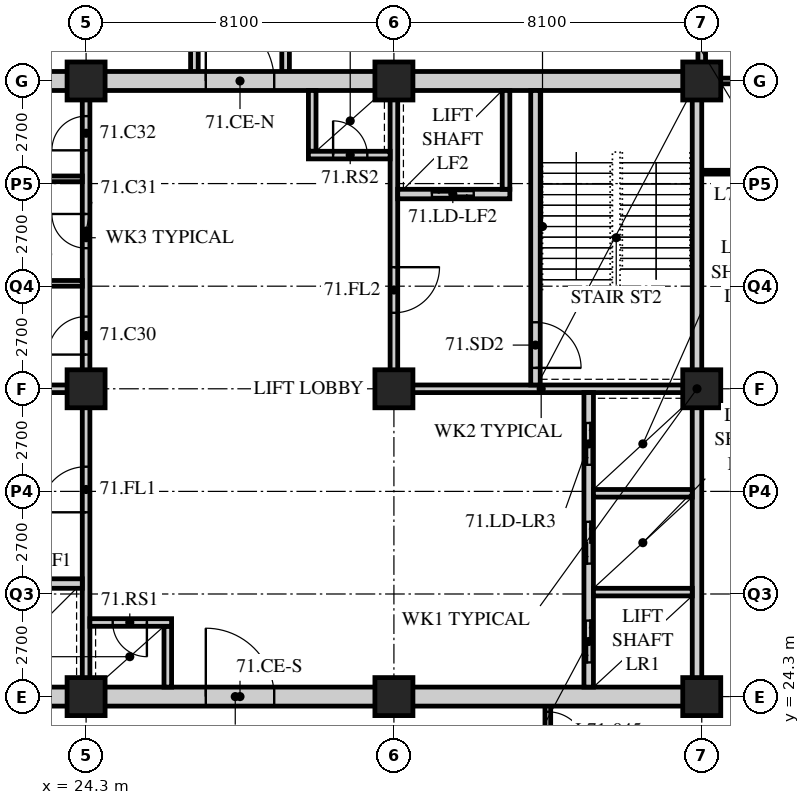
"""IFC4 building model, lengths in metres.
Left out: names, types, materials, properties, quantities, classifications, styles, units other than length and angle.
Written with IfcOpenShell. Run it as: python <this file> out.ifc"""

import sys

from ifc_helpers import new_model, si_unit, direction, frame, frame_2d, origin, origin_2d, place, context, subcontext, project, spatial, rectangle, hollow_rectangle, extrude, element, fill, save


model = new_model("IFC4")
c1 = context("Model", 3, precision=1e-05, world=origin(), true_north=direction((0.0, 1.0)))
c2 = subcontext(c1, "Body", "Model", "MODEL_VIEW")
j1 = project(units=[si_unit("LENGTHUNIT", "METRE"), si_unit("PLANEANGLEUNIT", "RADIAN")], contexts=[c1])
p1 = place(None, origin())
s1 = spatial("IfcSite", under=j1, at=p1, CompositionType="ELEMENT")
p2 = place(p1, origin())
s2 = spatial("IfcBuilding", under=s1, at=p2, CompositionType="ELEMENT")
p3 = place(p2, frame((0.0, 0.0, 277.5)))
s3 = spatial("IfcBuildingStorey", under=s2, at=p3, CompositionType="ELEMENT", Elevation=277.5)
for number, where, z_axis, x_axis in (
    (1, (24.3, 24.3, 0.0), (0.0, 0.0, 1.0), (1.0, 0.0, 0.0)),
    (2, (24.3, 32.4, 0.0), (0.0, 0.0, 1.0), (1.0, 0.0, 0.0)),
    (3, (24.3, 40.5, 0.0), (0.0, 0.0, 1.0), (1.0, 0.0, 0.0)),
    (4, (32.4, 24.3, 0.0), (0.0, 0.0, 1.0), (1.0, 0.0, 0.0)),
    (5, (32.4, 32.4, 0.0), (0.0, 0.0, 1.0), (1.0, 0.0, 0.0)),
    (6, (32.4, 40.5, 0.0), (0.0, 0.0, 1.0), (1.0, 0.0, 0.0)),
    (7, (40.5, 24.3, 0.0), (0.0, 0.0, 1.0), (1.0, 0.0, 0.0)),
    (8, (40.5, 32.4, 0.0), (0.0, 0.0, 1.0), (1.0, 0.0, 0.0)),
    (9, (40.5, 40.5, 0.0), (0.0, 0.0, 1.0), (1.0, 0.0, 0.0)),
):
    element("IfcColumn", number, at=place(p3, frame(where, z_axis=z_axis, x_axis=x_axis)), inside=s3, PredefinedType="COLUMN", context=c2, shape_type="SweptSolid", body=[
        extrude(hollow_rectangle(XDim=1.0, YDim=1.0, WallThickness=0.1, at=origin_2d()), origin(), (0.0, 0.0, 1.0), 3.9),
    ])
for number, where, z_axis, x_axis in (
    (10, (27.15, 40.5, 0.0), (0.0, 0.0, 1.0), (0.0, 1.0, 0.0)),
    (11, (29.55, 40.5, 0.0), (0.0, 0.0, 1.0), (0.0, 1.0, 0.0)),
):
    element("IfcWall", number, at=place(p3, frame(where, z_axis=z_axis, x_axis=x_axis)), inside=s3, PredefinedType="SOLIDWALL", context=c2, shape_type="SweptSolid", body=[
        extrude(rectangle(XDim=10.35, YDim=0.2, at=frame_2d((5.175, 0.0))), origin(), (0.0, 0.0, 1.0), 3.69),
    ])
p4 = place(p3, frame((36.45, 22.5, 0.0), z_axis=(0.0, 0.0, 1.0), x_axis=(0.0, 1.0, 0.0)))
e12 = element("IfcWall", 12, at=p4, inside=s3, PredefinedType="PARTITIONING", context=c2, shape_type="SweptSolid", body=[
    extrude(rectangle(XDim=1.8, YDim=0.15, at=frame_2d((0.9, 0.0))), origin(), (0.0, 0.0, 1.0), 3.69),
])
p5 = place(p4, frame((0.4, 0.0, 0.0)))
e13 = element("IfcOpeningElement", 13, at=p5, cuts=e12, PredefinedType="OPENING", context=c2, shape_type="SweptSolid", body=[
    extrude(rectangle(XDim=1.0, YDim=2.1, at=frame_2d((0.5, 1.05))), frame((0.0, 0.085, 0.0), z_axis=(0.0, -1.0, 0.0), x_axis=(1.0, 0.0, 0.0)), (0.0, 0.0, 1.0), 0.17),
])
p6 = place(p3, frame((40.5, 40.5, 0.0), z_axis=(0.0, 0.0, 1.0), x_axis=(0.0, 1.0, 0.0)))
e14 = element("IfcWall", 14, at=p6, inside=s3, PredefinedType="SOLIDWALL", context=c2, shape_type="SweptSolid", body=[
    extrude(rectangle(XDim=10.35, YDim=0.2, at=frame_2d((5.175, 0.0))), origin(), (0.0, 0.0, 1.0), 3.078),
])
p7 = place(p3, frame((40.5, 38.1, 0.0), z_axis=(0.0, 0.0, 1.0), x_axis=(1.0, 0.0, 0.0)))
e15 = element("IfcWall", 15, at=p7, inside=s3, PredefinedType="PARTITIONING", context=c2, shape_type="SweptSolid", body=[
    extrude(rectangle(XDim=2.4, YDim=0.1, at=frame_2d((1.2, 0.0))), origin(), (0.0, 0.0, 1.0), 3.69),
])
p8 = place(p7, frame((0.8, 0.0, 0.0)))
e16 = element("IfcOpeningElement", 16, at=p8, cuts=e15, PredefinedType="OPENING", context=c2, shape_type="SweptSolid", body=[
    extrude(rectangle(XDim=0.8, YDim=2.1, at=frame_2d((0.4, 1.05))), frame((0.0, 0.06, 0.0), z_axis=(0.0, -1.0, 0.0), x_axis=(1.0, 0.0, 0.0)), (0.0, 0.0, 1.0), 0.12),
])
p9 = place(p3, frame((40.5, 40.5, 0.0), z_axis=(0.0, 0.0, 1.0), x_axis=(1.0, 0.0, 0.0)))
e17 = element("IfcWall", 17, at=p9, inside=s3, PredefinedType="PARTITIONING", context=c2, shape_type="SweptSolid", body=[
    extrude(rectangle(XDim=15.9, YDim=0.15, at=frame_2d((7.95, 0.0))), origin(), (0.0, 0.0, 1.0), 3.078),
])
p10 = place(p3, frame((15.95, 24.3, 0.0), z_axis=(0.0, 0.0, 1.0), x_axis=(1.0, 0.0, 0.0)))
e18 = element("IfcWall", 18, at=p10, inside=s3, PredefinedType="SOLIDWALL", context=c2, shape_type="SweptSolid", body=[
    extrude(rectangle(XDim=24.55, YDim=0.5, at=frame_2d((12.275, 0.0))), origin(), (0.0, 0.0, 1.0), 3.04),
])
p11 = place(p10, frame((11.5, 0.0, 0.0)))
e19 = element("IfcOpeningElement", 19, at=p11, cuts=e18, PredefinedType="OPENING", context=c2, shape_type="SweptSolid", body=[
    extrude(rectangle(XDim=1.8, YDim=2.4, at=frame_2d((0.9, 1.2))), frame((0.0, 0.26, 0.0), z_axis=(0.0, -1.0, 0.0), x_axis=(1.0, 0.0, 0.0)), (0.0, 0.0, 1.0), 0.52),
])
p12 = place(p3, frame((15.95, 40.5, 0.0), z_axis=(0.0, 0.0, 1.0), x_axis=(1.0, 0.0, 0.0)))
e20 = element("IfcWall", 20, at=p12, inside=s3, PredefinedType="SOLIDWALL", context=c2, shape_type="SweptSolid", body=[
    extrude(rectangle(XDim=24.55, YDim=0.5, at=frame_2d((12.275, 0.0))), origin(), (0.0, 0.0, 1.0), 3.04),
])
p13 = place(p12, frame((11.5, 0.0, 0.0)))
e21 = element("IfcOpeningElement", 21, at=p13, cuts=e20, PredefinedType="OPENING", context=c2, shape_type="SweptSolid", body=[
    extrude(rectangle(XDim=1.8, YDim=2.4, at=frame_2d((0.9, 1.2))), frame((0.0, 0.26, 0.0), z_axis=(0.0, -1.0, 0.0), x_axis=(1.0, 0.0, 0.0)), (0.0, 0.0, 1.0), 0.52),
])
p14 = place(p3, frame((40.375, 24.55, 0.0), z_axis=(0.0, 0.0, 1.0), x_axis=(0.0, 1.0, 0.0)))
e22 = element("IfcWall", 22, at=p14, inside=s3, PredefinedType="SOLIDWALL", context=c2, shape_type="SweptSolid", body=[
    extrude(rectangle(XDim=15.7, YDim=0.25, at=frame_2d((7.85, 0.0))), origin(), (0.0, 0.0, 1.0), 3.078),
])
p15 = place(p3, frame((16.45, 32.4, 0.0), z_axis=(0.0, 0.0, 1.0), x_axis=(1.0, 0.0, 0.0)))
e23 = element("IfcWall", 23, at=p15, inside=s3, PredefinedType="SOLIDWALL", context=c2, shape_type="SweptSolid", body=[
    extrude(rectangle(XDim=7.95, YDim=0.2, at=frame_2d((3.975, 0.0))), origin(), (0.0, 0.0, 1.0), 3.078),
])
p16 = place(p3, frame((24.3, 24.55, 0.0), z_axis=(0.0, 0.0, 1.0), x_axis=(0.0, 1.0, 0.0)))
e24 = element("IfcWall", 24, at=p16, inside=s3, PredefinedType="SOLIDWALL", context=c2, shape_type="SweptSolid", body=[
    extrude(rectangle(XDim=7.75, YDim=0.2, at=frame_2d((3.875, 0.0))), origin(), (0.0, 0.0, 1.0), 3.078),
])
p17 = place(p16, frame((4.6, 0.0, 0.0)))
e25 = element("IfcOpeningElement", 25, at=p17, cuts=e24, PredefinedType="OPENING", context=c2, shape_type="SweptSolid", body=[
    extrude(rectangle(XDim=1.2, YDim=2.1, at=frame_2d((0.6, 1.05))), frame((0.0, 0.11, 0.0), z_axis=(0.0, -1.0, 0.0), x_axis=(1.0, 0.0, 0.0)), (0.0, 0.0, 1.0), 0.22),
])
p18 = place(p3, frame((21.25, 27.275, 0.0), z_axis=(0.0, 0.0, 1.0), x_axis=(1.0, 0.0, 0.0)))
e26 = element("IfcWall", 26, at=p18, inside=s3, PredefinedType="SOLIDWALL", context=c2, shape_type="SweptSolid", body=[
    extrude(rectangle(XDim=2.95, YDim=0.25, at=frame_2d((1.475, 0.0))), origin(), (0.0, 0.0, 1.0), 3.69),
])
p19 = place(p18, frame((0.95, 0.0, 0.0)))
e27 = element("IfcOpeningElement", 27, at=p19, cuts=e26, PredefinedType="OPENING", context=c2, shape_type="SweptSolid", body=[
    extrude(rectangle(XDim=1.1, YDim=2.4, at=frame_2d((0.55, 1.2))), frame((0.0, 0.135, 0.0), z_axis=(0.0, -1.0, 0.0), x_axis=(1.0, 0.0, 0.0)), (0.0, 0.0, 1.0), 0.27),
])
p20 = place(p3, frame((26.45, 24.55, 0.0), z_axis=(0.0, 0.0, 1.0), x_axis=(0.0, 1.0, 0.0)))
e28 = element("IfcWall", 28, at=p20, inside=s3, PredefinedType="SOLIDWALL", context=c2, shape_type="SweptSolid", body=[
    extrude(rectangle(XDim=1.6, YDim=0.2, at=frame_2d((0.8, 0.0))), origin(), (0.0, 0.0, 1.0), 3.69),
])
p21 = place(p3, frame((24.4, 26.25, 0.0), z_axis=(0.0, 0.0, 1.0), x_axis=(1.0, 0.0, 0.0)))
e29 = element("IfcWall", 29, at=p21, inside=s3, PredefinedType="SOLIDWALL", context=c2, shape_type="SweptSolid", body=[
    extrude(rectangle(XDim=2.15, YDim=0.2, at=frame_2d((1.075, 0.0))), origin(), (0.0, 0.0, 1.0), 3.69),
])
p22 = place(p21, frame((0.6, 0.0, 0.0)))
e30 = element("IfcOpeningElement", 30, at=p22, cuts=e29, PredefinedType="OPENING", context=c2, shape_type="SweptSolid", body=[
    extrude(rectangle(XDim=0.9, YDim=2.1, at=frame_2d((0.45, 1.05))), frame((0.0, 0.11, 0.0), z_axis=(0.0, -1.0, 0.0), x_axis=(1.0, 0.0, 0.0)), (0.0, 0.0, 1.0), 0.22),
])
p23 = place(p3, frame((32.3, 32.4, 0.0), z_axis=(0.0, 0.0, 1.0), x_axis=(1.0, 0.0, 0.0)))
e31 = element("IfcWall", 31, at=p23, inside=s3, PredefinedType="SOLIDWALL", context=c2, shape_type="SweptSolid", body=[
    extrude(rectangle(XDim=7.95, YDim=0.2, at=frame_2d((3.975, 0.0))), origin(), (0.0, 0.0, 1.0), 3.078),
])
p24 = place(p3, frame((32.4, 32.5, 0.0), z_axis=(0.0, 0.0, 1.0), x_axis=(0.0, 1.0, 0.0)))
e32 = element("IfcWall", 32, at=p24, inside=s3, PredefinedType="SOLIDWALL", context=c2, shape_type="SweptSolid", body=[
    extrude(rectangle(XDim=7.75, YDim=0.2, at=frame_2d((3.875, 0.0))), origin(), (0.0, 0.0, 1.0), 3.078),
])
p25 = place(p24, frame((1.9, 0.0, 0.0)))
e33 = element("IfcOpeningElement", 33, at=p25, cuts=e32, PredefinedType="OPENING", context=c2, shape_type="SweptSolid", body=[
    extrude(rectangle(XDim=1.2, YDim=2.1, at=frame_2d((0.6, 1.05))), frame((0.0, 0.11, 0.0), z_axis=(0.0, -1.0, 0.0), x_axis=(1.0, 0.0, 0.0)), (0.0, 0.0, 1.0), 0.22),
])
p26 = place(p3, frame((37.525, 24.55, 0.0), z_axis=(0.0, 0.0, 1.0), x_axis=(0.0, 1.0, 0.0)))
e34 = element("IfcWall", 34, at=p26, inside=s3, PredefinedType="SOLIDWALL", context=c2, shape_type="SweptSolid", body=[
    extrude(rectangle(XDim=7.75, YDim=0.25, at=frame_2d((3.875, 0.0))), origin(), (0.0, 0.0, 1.0), 3.69),
])
p27 = place(p26, frame((0.65, 0.0, 0.0)))
e35 = element("IfcOpeningElement", 35, at=p27, cuts=e34, PredefinedType="OPENING", context=c2, shape_type="SweptSolid", body=[
    extrude(rectangle(XDim=1.1, YDim=2.4, at=frame_2d((0.55, 1.2))), frame((0.0, 0.135, 0.0), z_axis=(0.0, -1.0, 0.0), x_axis=(1.0, 0.0, 0.0)), (0.0, 0.0, 1.0), 0.27),
])
p28 = place(p26, frame((3.25, 0.0, 0.0)))
e36 = element("IfcOpeningElement", 36, at=p28, cuts=e34, PredefinedType="OPENING", context=c2, shape_type="SweptSolid", body=[
    extrude(rectangle(XDim=1.1, YDim=2.4, at=frame_2d((0.55, 1.2))), frame((0.0, 0.135, 0.0), z_axis=(0.0, -1.0, 0.0), x_axis=(1.0, 0.0, 0.0)), (0.0, 0.0, 1.0), 0.27),
])
p29 = place(p26, frame((5.85, 0.0, 0.0)))
e37 = element("IfcOpeningElement", 37, at=p29, cuts=e34, PredefinedType="OPENING", context=c2, shape_type="SweptSolid", body=[
    extrude(rectangle(XDim=1.1, YDim=2.4, at=frame_2d((0.55, 1.2))), frame((0.0, 0.135, 0.0), z_axis=(0.0, -1.0, 0.0), x_axis=(1.0, 0.0, 0.0)), (0.0, 0.0, 1.0), 0.27),
])
for number, where, z_axis, x_axis in (
    (38, (37.65, 27.05, 0.0), (0.0, 0.0, 1.0), (1.0, 0.0, 0.0)),
    (39, (37.65, 29.65, 0.0), (0.0, 0.0, 1.0), (1.0, 0.0, 0.0)),
):
    element("IfcWall", number, at=place(p3, frame(where, z_axis=z_axis, x_axis=x_axis)), inside=s3, PredefinedType="SOLIDWALL", context=c2, shape_type="SweptSolid", body=[
        extrude(rectangle(XDim=2.6, YDim=0.2, at=frame_2d((1.3, 0.0))), origin(), (0.0, 0.0, 1.0), 3.69),
    ])
p30 = place(p3, frame((36.125, 32.5, 0.0), z_axis=(0.0, 0.0, 1.0), x_axis=(0.0, 1.0, 0.0)))
e40 = element("IfcWall", 40, at=p30, inside=s3, PredefinedType="SOLIDWALL", context=c2, shape_type="SweptSolid", body=[
    extrude(rectangle(XDim=7.75, YDim=0.25, at=frame_2d((3.875, 0.0))), origin(), (0.0, 0.0, 1.0), 3.69),
])
p31 = place(p30, frame((0.45, 0.0, 0.0)))
e41 = element("IfcOpeningElement", 41, at=p31, cuts=e40, PredefinedType="OPENING", context=c2, shape_type="SweptSolid", body=[
    extrude(rectangle(XDim=1.2, YDim=2.1, at=frame_2d((0.6, 1.05))), frame((0.0, 0.135, 0.0), z_axis=(0.0, -1.0, 0.0), x_axis=(1.0, 0.0, 0.0)), (0.0, 0.0, 1.0), 0.27),
])
p32 = place(p3, frame((32.5, 37.525, 0.0), z_axis=(0.0, 0.0, 1.0), x_axis=(1.0, 0.0, 0.0)))
e42 = element("IfcWall", 42, at=p32, inside=s3, PredefinedType="SOLIDWALL", context=c2, shape_type="SweptSolid", body=[
    extrude(rectangle(XDim=2.95, YDim=0.25, at=frame_2d((1.475, 0.0))), origin(), (0.0, 0.0, 1.0), 3.69),
])
p33 = place(p32, frame((0.9, 0.0, 0.0)))
e43 = element("IfcOpeningElement", 43, at=p33, cuts=e42, PredefinedType="OPENING", context=c2, shape_type="SweptSolid", body=[
    extrude(rectangle(XDim=1.1, YDim=2.4, at=frame_2d((0.55, 1.2))), frame((0.0, 0.135, 0.0), z_axis=(0.0, -1.0, 0.0), x_axis=(1.0, 0.0, 0.0)), (0.0, 0.0, 1.0), 0.27),
])
p34 = place(p3, frame((35.35, 37.65, 0.0), z_axis=(0.0, 0.0, 1.0), x_axis=(0.0, 1.0, 0.0)))
e44 = element("IfcWall", 44, at=p34, inside=s3, PredefinedType="SOLIDWALL", context=c2, shape_type="SweptSolid", body=[
    extrude(rectangle(XDim=2.6, YDim=0.2, at=frame_2d((1.3, 0.0))), origin(), (0.0, 0.0, 1.0), 3.69),
])
p35 = place(p3, frame((30.25, 38.65, 0.0), z_axis=(0.0, 0.0, 1.0), x_axis=(0.0, 1.0, 0.0)))
e45 = element("IfcWall", 45, at=p35, inside=s3, PredefinedType="SOLIDWALL", context=c2, shape_type="SweptSolid", body=[
    extrude(rectangle(XDim=1.6, YDim=0.2, at=frame_2d((0.8, 0.0))), origin(), (0.0, 0.0, 1.0), 3.69),
])
p36 = place(p3, frame((30.15, 38.55, 0.0), z_axis=(0.0, 0.0, 1.0), x_axis=(1.0, 0.0, 0.0)))
e46 = element("IfcWall", 46, at=p36, inside=s3, PredefinedType="SOLIDWALL", context=c2, shape_type="SweptSolid", body=[
    extrude(rectangle(XDim=2.15, YDim=0.2, at=frame_2d((1.075, 0.0))), origin(), (0.0, 0.0, 1.0), 3.69),
])
p37 = place(p36, frame((0.65, 0.0, 0.0)))
e47 = element("IfcOpeningElement", 47, at=p37, cuts=e46, PredefinedType="OPENING", context=c2, shape_type="SweptSolid", body=[
    extrude(rectangle(XDim=0.9, YDim=2.1, at=frame_2d((0.45, 1.05))), frame((0.0, 0.11, 0.0), z_axis=(0.0, -1.0, 0.0), x_axis=(1.0, 0.0, 0.0)), (0.0, 0.0, 1.0), 0.22),
])
p38 = place(p3, frame((24.3, 32.5, 0.0), z_axis=(0.0, 0.0, 1.0), x_axis=(0.0, 1.0, 0.0)))
e48 = element("IfcWall", 48, at=p38, inside=s3, PredefinedType="PARTITIONING", context=c2, shape_type="SweptSolid", body=[
    extrude(rectangle(XDim=7.75, YDim=0.2, at=frame_2d((3.875, 0.0))), origin(), (0.0, 0.0, 1.0), 3.078),
])
p39 = place(p38, frame((0.8, 0.0, 0.0)))
e49 = element("IfcOpeningElement", 49, at=p39, cuts=e48, PredefinedType="OPENING", context=c2, shape_type="SweptSolid", body=[
    extrude(rectangle(XDim=1.0, YDim=2.1, at=frame_2d((0.5, 1.05))), frame((0.0, 0.11, 0.0), z_axis=(0.0, -1.0, 0.0), x_axis=(1.0, 0.0, 0.0)), (0.0, 0.0, 1.0), 0.22),
])
p40 = place(p38, frame((3.6, 0.0, 0.0)))
e50 = element("IfcOpeningElement", 50, at=p40, cuts=e48, PredefinedType="OPENING", context=c2, shape_type="SweptSolid", body=[
    extrude(rectangle(XDim=0.9, YDim=2.1, at=frame_2d((0.45, 1.05))), frame((0.0, 0.11, 0.0), z_axis=(0.0, -1.0, 0.0), x_axis=(1.0, 0.0, 0.0)), (0.0, 0.0, 1.0), 0.22),
])
p41 = place(p38, frame((6.175, 0.0, 0.0)))
e51 = element("IfcOpeningElement", 51, at=p41, cuts=e48, PredefinedType="OPENING", context=c2, shape_type="SweptSolid", body=[
    extrude(rectangle(XDim=0.9, YDim=2.1, at=frame_2d((0.45, 1.05))), frame((0.0, 0.11, 0.0), z_axis=(0.0, -1.0, 0.0), x_axis=(1.0, 0.0, 0.0)), (0.0, 0.0, 1.0), 0.22),
])
for number, where, z_axis, x_axis in (
    (52, (21.65, 35.175, 0.0), (0.0, 0.0, 1.0), (1.0, 0.0, 0.0)),
    (53, (21.65, 37.925, 0.0), (0.0, 0.0, 1.0), (1.0, 0.0, 0.0)),
):
    element("IfcWall", number, at=place(p3, frame(where, z_axis=z_axis, x_axis=x_axis)), inside=s3, PredefinedType="PARTITIONING", context=c2, shape_type="SweptSolid", body=[
        extrude(rectangle(XDim=2.55, YDim=0.15, at=frame_2d((1.275, 0.0))), origin(), (0.0, 0.0, 1.0), 3.69),
    ])
p42 = place(p5, origin())
e54 = element("IfcDoor", 54, at=p42, inside=s3, OperationType="SINGLE_SWING_RIGHT", PredefinedType="DOOR", context=c2, shape_type="SweptSolid", body=[
    extrude(rectangle(XDim=1.0, YDim=2.1, at=frame_2d((0.5, 1.05))), frame((0.0, 0.025, 0.0), z_axis=(0.0, -1.0, 0.0), x_axis=(1.0, 0.0, 0.0)), (0.0, 0.0, 1.0), 0.05),
])
fill(e13, e54)
p43 = place(p39, origin())
e55 = element("IfcDoor", 55, at=p43, inside=s3, OperationType="SINGLE_SWING_LEFT", PredefinedType="DOOR", context=c2, shape_type="SweptSolid", body=[
    extrude(rectangle(XDim=1.0, YDim=2.1, at=frame_2d((0.5, 1.05))), frame((0.0, 0.025, 0.0), z_axis=(0.0, -1.0, 0.0), x_axis=(1.0, 0.0, 0.0)), (0.0, 0.0, 1.0), 0.05),
])
fill(e49, e55)
p44 = place(p40, origin())
e56 = element("IfcDoor", 56, at=p44, inside=s3, OperationType="SINGLE_SWING_RIGHT", PredefinedType="DOOR", context=c2, shape_type="SweptSolid", body=[
    extrude(rectangle(XDim=0.9, YDim=2.1, at=frame_2d((0.45, 1.05))), frame((0.0, 0.025, 0.0), z_axis=(0.0, -1.0, 0.0), x_axis=(1.0, 0.0, 0.0)), (0.0, 0.0, 1.0), 0.05),
])
fill(e50, e56)
p45 = place(p41, origin())
e57 = element("IfcDoor", 57, at=p45, inside=s3, OperationType="SINGLE_SWING_LEFT", PredefinedType="DOOR", context=c2, shape_type="SweptSolid", body=[
    extrude(rectangle(XDim=0.9, YDim=2.1, at=frame_2d((0.45, 1.05))), frame((0.0, 0.025, 0.0), z_axis=(0.0, -1.0, 0.0), x_axis=(1.0, 0.0, 0.0)), (0.0, 0.0, 1.0), 0.05),
])
fill(e51, e57)
p46 = place(p17, origin())
e58 = element("IfcDoor", 58, at=p46, inside=s3, OperationType="SINGLE_SWING_LEFT", PredefinedType="DOOR", context=c2, shape_type="SweptSolid", body=[
    extrude(rectangle(XDim=1.2, YDim=2.1, at=frame_2d((0.6, 1.05))), frame((0.0, 0.025, 0.0), z_axis=(0.0, -1.0, 0.0), x_axis=(1.0, 0.0, 0.0)), (0.0, 0.0, 1.0), 0.05),
])
fill(e25, e58)
p47 = place(p22, origin())
e59 = element("IfcDoor", 59, at=p47, inside=s3, OperationType="SINGLE_SWING_LEFT", PredefinedType="DOOR", context=c2, shape_type="SweptSolid", body=[
    extrude(rectangle(XDim=0.9, YDim=2.1, at=frame_2d((0.45, 1.05))), frame((0.0, 0.025, 0.0), z_axis=(0.0, -1.0, 0.0), x_axis=(1.0, 0.0, 0.0)), (0.0, 0.0, 1.0), 0.05),
])
fill(e30, e59)
p48 = place(p31, origin())
e60 = element("IfcDoor", 60, at=p48, inside=s3, OperationType="SINGLE_SWING_RIGHT", PredefinedType="DOOR", context=c2, shape_type="SweptSolid", body=[
    extrude(rectangle(XDim=1.2, YDim=2.1, at=frame_2d((0.6, 1.05))), frame((0.0, 0.025, 0.0), z_axis=(0.0, -1.0, 0.0), x_axis=(1.0, 0.0, 0.0)), (0.0, 0.0, 1.0), 0.05),
])
fill(e41, e60)
p49 = place(p25, origin())
e61 = element("IfcDoor", 61, at=p49, inside=s3, OperationType="SINGLE_SWING_LEFT", PredefinedType="DOOR", context=c2, shape_type="SweptSolid", body=[
    extrude(rectangle(XDim=1.2, YDim=2.1, at=frame_2d((0.6, 1.05))), frame((0.0, 0.025, 0.0), z_axis=(0.0, -1.0, 0.0), x_axis=(1.0, 0.0, 0.0)), (0.0, 0.0, 1.0), 0.05),
])
fill(e33, e61)
p50 = place(p37, origin())
e62 = element("IfcDoor", 62, at=p50, inside=s3, OperationType="SINGLE_SWING_LEFT", PredefinedType="DOOR", context=c2, shape_type="SweptSolid", body=[
    extrude(rectangle(XDim=0.9, YDim=2.1, at=frame_2d((0.45, 1.05))), frame((0.0, 0.025, 0.0), z_axis=(0.0, -1.0, 0.0), x_axis=(1.0, 0.0, 0.0)), (0.0, 0.0, 1.0), 0.05),
])
fill(e47, e62)
p51 = place(p27, origin())
e63 = element("IfcDoor", 63, at=p51, inside=s3, OperationType="DOUBLE_DOOR_SLIDING", PredefinedType="DOOR", context=c2, shape_type="SweptSolid", body=[
    extrude(rectangle(XDim=1.1, YDim=2.4, at=frame_2d((0.55, 1.2))), frame((0.0, 0.025, 0.0), z_axis=(0.0, -1.0, 0.0), x_axis=(1.0, 0.0, 0.0)), (0.0, 0.0, 1.0), 0.05),
])
fill(e35, e63)
p52 = place(p28, origin())
e64 = element("IfcDoor", 64, at=p52, inside=s3, OperationType="DOUBLE_DOOR_SLIDING", PredefinedType="DOOR", context=c2, shape_type="SweptSolid", body=[
    extrude(rectangle(XDim=1.1, YDim=2.4, at=frame_2d((0.55, 1.2))), frame((0.0, 0.025, 0.0), z_axis=(0.0, -1.0, 0.0), x_axis=(1.0, 0.0, 0.0)), (0.0, 0.0, 1.0), 0.05),
])
fill(e36, e64)
p53 = place(p29, origin())
e65 = element("IfcDoor", 65, at=p53, inside=s3, OperationType="DOUBLE_DOOR_SLIDING", PredefinedType="DOOR", context=c2, shape_type="SweptSolid", body=[
    extrude(rectangle(XDim=1.1, YDim=2.4, at=frame_2d((0.55, 1.2))), frame((0.0, 0.025, 0.0), z_axis=(0.0, -1.0, 0.0), x_axis=(1.0, 0.0, 0.0)), (0.0, 0.0, 1.0), 0.05),
])
fill(e37, e65)
p54 = place(p33, origin())
e66 = element("IfcDoor", 66, at=p54, inside=s3, OperationType="DOUBLE_DOOR_SLIDING", PredefinedType="DOOR", context=c2, shape_type="SweptSolid", body=[
    extrude(rectangle(XDim=1.1, YDim=2.4, at=frame_2d((0.55, 1.2))), frame((0.0, 0.025, 0.0), z_axis=(0.0, -1.0, 0.0), x_axis=(1.0, 0.0, 0.0)), (0.0, 0.0, 1.0), 0.05),
])
fill(e43, e66)
p55 = place(p11, origin())
e67 = element("IfcDoor", 67, at=p55, inside=s3, OperationType="DOUBLE_DOOR_SINGLE_SWING", PredefinedType="DOOR", context=c2, shape_type="SweptSolid", body=[
    extrude(rectangle(XDim=1.8, YDim=2.4, at=frame_2d((0.9, 1.2))), frame((0.0, 0.025, 0.0), z_axis=(0.0, -1.0, 0.0), x_axis=(1.0, 0.0, 0.0)), (0.0, 0.0, 1.0), 0.05),
])
fill(e19, e67)
p56 = place(p13, origin())
e68 = element("IfcDoor", 68, at=p56, inside=s3, OperationType="DOUBLE_DOOR_SINGLE_SWING", PredefinedType="DOOR", context=c2, shape_type="SweptSolid", body=[
    extrude(rectangle(XDim=1.8, YDim=2.4, at=frame_2d((0.9, 1.2))), frame((0.0, 0.025, 0.0), z_axis=(0.0, -1.0, 0.0), x_axis=(1.0, 0.0, 0.0)), (0.0, 0.0, 1.0), 0.05),
])
fill(e21, e68)
save(model, sys.argv[1])
